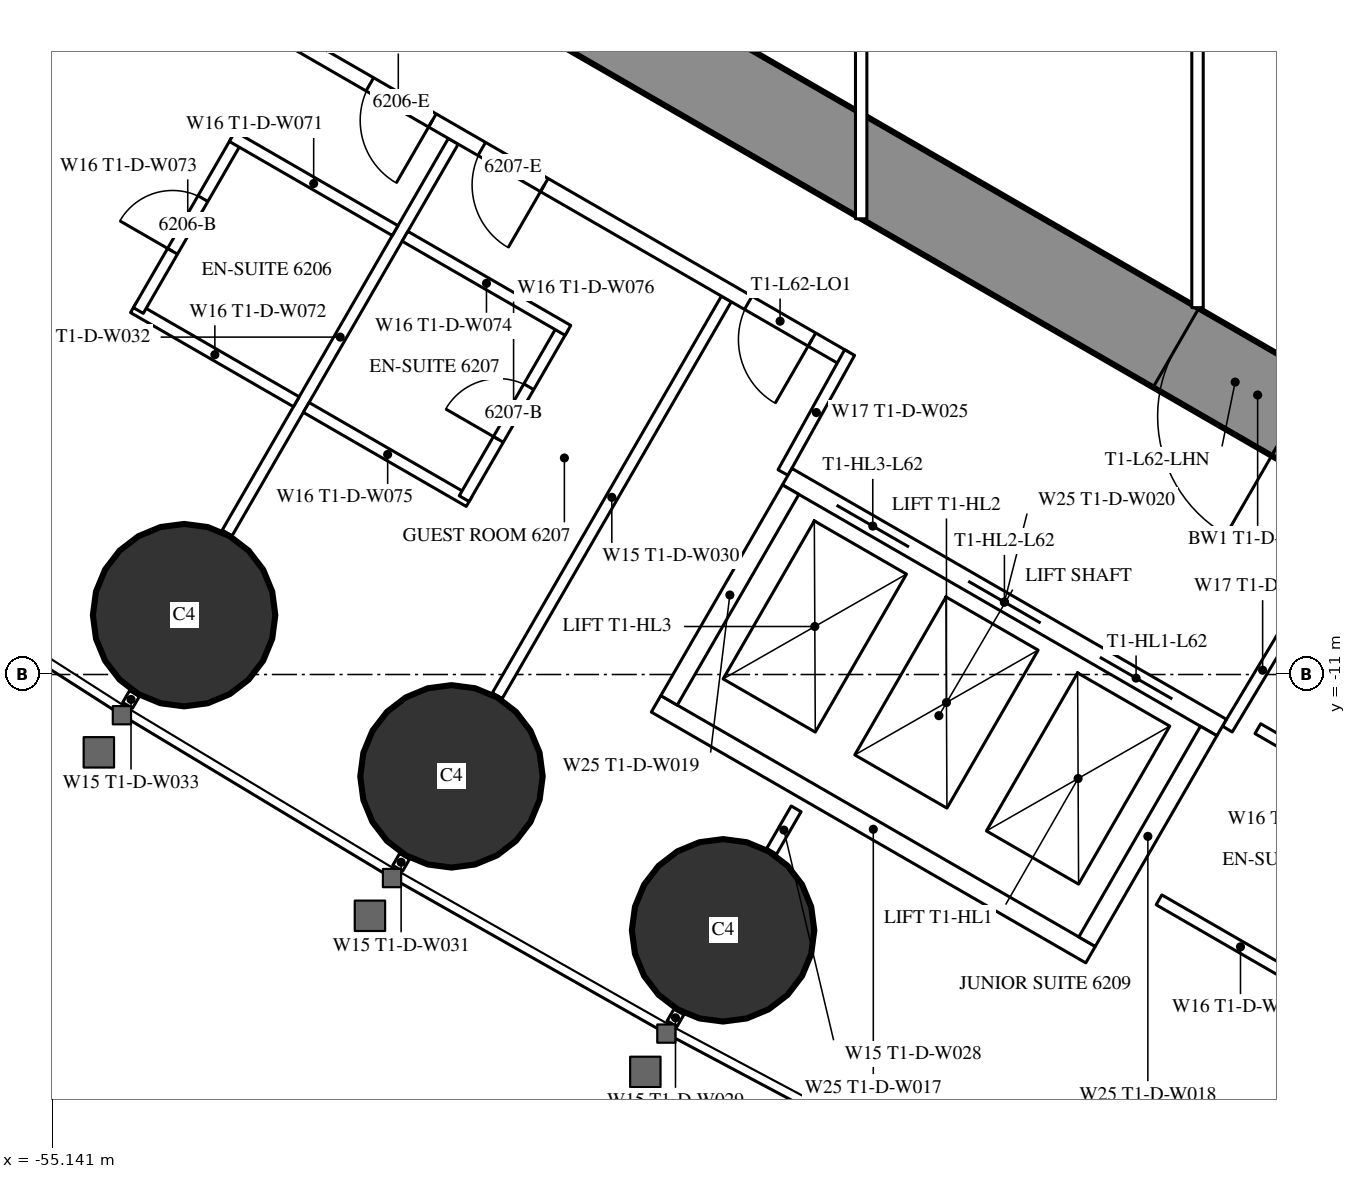
"""IFC4 building model, lengths in metres.
Left out: names, types, materials, properties, quantities, classifications, styles, units other than length and angle.
Written with IfcOpenShell. Run it as: python <this file> out.ifc"""

import sys

from ifc_helpers import new_model, si_unit, direction, frame, frame_2d, origin, origin_2d, place, context, subcontext, project, spatial, rectangle, circle, extrude, element, fill, save


model = new_model("IFC4")
c1 = context("Model", 3, precision=1e-05, world=origin(), true_north=direction((0.0, 1.0)))
c2 = subcontext(c1, "Body", "Model", "MODEL_VIEW")
j1 = project(units=[si_unit("LENGTHUNIT", "METRE"), si_unit("PLANEANGLEUNIT", "RADIAN")], contexts=[c1])
p1 = place(None, origin())
s1 = spatial("IfcSite", under=j1, at=p1, CompositionType="ELEMENT")
p2 = place(p1, origin())
s2 = spatial("IfcBuilding", under=s1, at=p2, CompositionType="ELEMENT")
p3 = place(p2, frame((0.0, 0.0, 233.3)))
s3 = spatial("IfcBuildingStorey", under=s2, at=p3, CompositionType="ELEMENT", Elevation=233.3)
for number, where, z_axis, x_axis in (
    (1, (-53.408, -10.219, 0.0), (0.0, 0.0, 1.0), (1.0, 0.0, 0.0)),
    (2, (-49.89, -12.34, 0.0), (0.0, 0.0, 1.0), (1.0, 0.0, 0.0)),
    (3, (-46.317, -14.365, 0.0), (0.0, 0.0, 1.0), (1.0, 0.0, 0.0)),
):
    element("IfcColumn", number, at=place(p3, frame(where, z_axis=z_axis, x_axis=x_axis)), inside=s3, PredefinedType="COLUMN", context=c2, shape_type="SweptSolid", body=[
        extrude(circle(Radius=1.2, at=origin_2d()), origin(), (0.0, 0.0, 1.0), 3.6),
    ])
p4 = place(p3, frame((-27.2, -14.3, 0.0), z_axis=(0.0, 0.0, 1.0), x_axis=(-0.866024021859, 0.500002393557, 0.0)))
e4 = element("IfcWall", 4, at=p4, inside=s3, PredefinedType="SHEAR", context=c2, shape_type="SweptSolid", body=[
    extrude(rectangle(XDim=27.907, YDim=1.2, at=frame_2d((13.954, 0.0))), origin(), (0.0, 0.0, 1.0), 3.6),
])
p5 = place(p4, frame((4.6, 0.0, 0.0)))
e5 = element("IfcOpeningElement", 5, at=p5, cuts=e4, PredefinedType="OPENING", context=c2, shape_type="SweptSolid", body=[
    extrude(rectangle(XDim=1.0, YDim=2.2, at=frame_2d((0.5, 1.1))), frame((0.0, 0.61, 0.0), z_axis=(0.0, -1.0, 0.0), x_axis=(1.0, 0.0, 0.0)), (0.0, 0.0, 1.0), 1.22),
])
p6 = place(p4, frame((13.395, 0.0, 0.0)))
e6 = element("IfcOpeningElement", 6, at=p6, cuts=e4, PredefinedType="OPENING", context=c2, shape_type="SweptSolid", body=[
    extrude(rectangle(XDim=1.8, YDim=2.2, at=frame_2d((0.9, 1.1))), frame((0.0, 0.61, 0.0), z_axis=(0.0, -1.0, 0.0), x_axis=(1.0, 0.0, 0.0)), (0.0, 0.0, 1.0), 1.22),
])
p7 = place(p3, frame((-46.898, -15.439, 0.0), z_axis=(0.0, 0.0, 1.0), x_axis=(-0.500232303069, -0.865891241997, 0.0)))
e7 = element("IfcWall", 7, at=p7, inside=s3, PredefinedType="PARTITIONING", context=c2, shape_type="SweptSolid", body=[
    extrude(rectangle(XDim=0.18, YDim=0.15, at=frame_2d((0.09, 0.0))), origin(), (0.0, 0.0, 1.0), 2.45),
])
p8 = place(p3, frame((-46.274, -6.059, 0.0), z_axis=(0.0, 0.0, 1.0), x_axis=(-0.500020471368, -0.866013584312, 0.0)))
e8 = element("IfcWall", 8, at=p8, inside=s3, PredefinedType="PARTITIONING", context=c2, shape_type="SweptSolid", body=[
    extrude(rectangle(XDim=6.028, YDim=0.15, at=frame_2d((3.014, 0.0))), origin(), (0.0, 0.0, 1.0), 2.45),
])
p9 = place(p3, frame((-50.508, -13.392, 0.0), z_axis=(0.0, 0.0, 1.0), x_axis=(-0.499644091975, -0.866230789891, 0.0)))
e9 = element("IfcWall", 9, at=p9, inside=s3, PredefinedType="PARTITIONING", context=c2, shape_type="SweptSolid", body=[
    extrude(rectangle(XDim=0.18, YDim=0.15, at=frame_2d((0.09, 0.0))), origin(), (0.0, 0.0, 1.0), 2.45),
])
p10 = place(p3, frame((-49.866, -3.985, 0.0), z_axis=(0.0, 0.0, 1.0), x_axis=(-0.500000694566, -0.866025002776, 0.0)))
e10 = element("IfcWall", 10, at=p10, inside=s3, PredefinedType="PARTITIONING", context=c2, shape_type="SweptSolid", body=[
    extrude(rectangle(XDim=5.95, YDim=0.15, at=frame_2d((2.975, 0.0))), origin(), (0.0, 0.0, 1.0), 2.45),
])
p11 = place(p3, frame((-54.061, -11.25, 0.0), z_axis=(0.0, 0.0, 1.0), x_axis=(-0.500391173478, -0.865799441849, 0.0)))
e11 = element("IfcWall", 11, at=p11, inside=s3, PredefinedType="PARTITIONING", context=c2, shape_type="SweptSolid", body=[
    extrude(rectangle(XDim=0.179, YDim=0.15, at=frame_2d((0.089, 0.0))), origin(), (0.0, 0.0, 1.0), 2.45),
])
p12 = place(p3, frame((-45.356, -12.767, 0.0), z_axis=(0.0, 0.0, 1.0), x_axis=(-0.499886366516, -0.866091000168, 0.0)))
e12 = element("IfcWall", 12, at=p12, inside=s3, PredefinedType="PARTITIONING", context=c2, shape_type="SweptSolid", body=[
    extrude(rectangle(XDim=0.645, YDim=0.15, at=frame_2d((0.322, 0.0))), origin(), (0.0, 0.0, 1.0), 3.35),
])
p13 = place(p3, frame((-44.715, -6.844, 0.0), z_axis=(0.0, 0.0, 1.0), x_axis=(-0.866025261224, 0.500000246922, 0.0)))
e13 = element("IfcWall", 13, at=p13, inside=s3, PredefinedType="PARTITIONING", context=c2, shape_type="SweptSolid", body=[
    extrude(rectangle(XDim=13.567, YDim=0.2, at=frame_2d((6.783, 0.0))), origin(), (0.0, 0.0, 1.0), 3.35),
])
p14 = place(p13, frame((6.266, 0.0, 0.0)))
e14 = element("IfcOpeningElement", 14, at=p14, cuts=e13, PredefinedType="OPENING", context=c2, shape_type="SweptSolid", body=[
    extrude(rectangle(XDim=0.95, YDim=2.2, at=frame_2d((0.475, 1.1))), frame((0.0, 0.11, 0.0), z_axis=(0.0, -1.0, 0.0), x_axis=(1.0, 0.0, 0.0)), (0.0, 0.0, 1.0), 0.22),
])
p15 = place(p13, frame((4.565, 0.0, 0.0)))
e15 = element("IfcOpeningElement", 15, at=p15, cuts=e13, PredefinedType="OPENING", context=c2, shape_type="SweptSolid", body=[
    extrude(rectangle(XDim=0.95, YDim=2.2, at=frame_2d((0.475, 1.1))), frame((0.0, 0.11, 0.0), z_axis=(0.0, -1.0, 0.0), x_axis=(1.0, 0.0, 0.0)), (0.0, 0.0, 1.0), 0.22),
])
p16 = place(p13, frame((0.5, 0.0, 0.0)))
e16 = element("IfcOpeningElement", 16, at=p16, cuts=e13, PredefinedType="OPENING", context=c2, shape_type="SweptSolid", body=[
    extrude(rectangle(XDim=0.967, YDim=2.2, at=frame_2d((0.483, 1.1))), frame((0.0, 0.11, 0.0), z_axis=(0.0, -1.0, 0.0), x_axis=(1.0, 0.0, 0.0)), (0.0, 0.0, 1.0), 0.22),
])
for number, where, z_axis, x_axis in (
    (17, (-39.683, -11.718, 0.0), (0.0, 0.0, 1.0), (0.514, 0.858, 0.0)),
    (18, (-44.652, -6.764, 0.0), (0.0, 0.0, 1.0), (-0.485, -0.874, 0.0)),
):
    element("IfcWall", number, at=place(p3, frame(where, z_axis=z_axis, x_axis=x_axis)), inside=s3, PredefinedType="PARTITIONING", context=c2, shape_type="SweptSolid", body=[
        extrude(rectangle(XDim=1.805, YDim=0.15, at=frame_2d((0.903, 0.0))), origin(), (0.0, 0.0, 1.0), 3.35),
    ])
p17 = place(p3, frame((-51.931, -7.411, 0.0), z_axis=(0.0, 0.0, 1.0), x_axis=(-0.866006523861, 0.500032699561, 0.0)))
e19 = element("IfcWall", 19, at=p17, inside=s3, PredefinedType="PARTITIONING", context=c2, shape_type="SweptSolid", body=[
    extrude(rectangle(XDim=2.475, YDim=0.15, at=frame_2d((1.237, 0.0))), origin(), (0.0, 0.0, 1.0), 3.35),
])
p18 = place(p3, frame((-52.71, -3.96, 0.0), z_axis=(0.0, 0.0, 1.0), x_axis=(-0.500006934395, -0.866021400173, 0.0)))
e20 = element("IfcWall", 20, at=p18, inside=s3, PredefinedType="PARTITIONING", context=c2, shape_type="SweptSolid", body=[
    extrude(rectangle(XDim=2.6, YDim=0.15, at=frame_2d((1.3, 0.0))), origin(), (0.0, 0.0, 1.0), 3.35),
])
p19 = place(p18, frame((0.9, 0.0, 0.0)))
e21 = element("IfcOpeningElement", 21, at=p19, cuts=e20, PredefinedType="OPENING", context=c2, shape_type="SweptSolid", body=[
    extrude(rectangle(XDim=0.8, YDim=2.2, at=frame_2d((0.4, 1.1))), frame((0.0, 0.085, 0.0), z_axis=(0.0, -1.0, 0.0), x_axis=(1.0, 0.0, 0.0)), (0.0, 0.0, 1.0), 0.17),
])
p20 = place(p3, frame((-50.631, -5.16, 0.0), z_axis=(0.0, 0.0, 1.0), x_axis=(-0.86604923931, 0.499958713387, 0.0)))
e22 = element("IfcWall", 22, at=p20, inside=s3, PredefinedType="PARTITIONING", context=c2, shape_type="SweptSolid", body=[
    extrude(rectangle(XDim=2.475, YDim=0.15, at=frame_2d((1.237, 0.0))), origin(), (0.0, 0.0, 1.0), 2.5),
])
p21 = place(p3, frame((-49.658, -8.724, 0.0), z_axis=(0.0, 0.0, 1.0), x_axis=(-0.866031185235, 0.4999899861, 0.0)))
e23 = element("IfcWall", 23, at=p21, inside=s3, PredefinedType="PARTITIONING", context=c2, shape_type="SweptSolid", body=[
    extrude(rectangle(XDim=2.475, YDim=0.15, at=frame_2d((1.238, 0.0))), origin(), (0.0, 0.0, 1.0), 3.35),
])
p22 = place(p3, frame((-48.423, -6.435, 0.0), z_axis=(0.0, 0.0, 1.0), x_axis=(-0.500006934395, -0.866021400173, 0.0)))
e24 = element("IfcWall", 24, at=p22, inside=s3, PredefinedType="PARTITIONING", context=c2, shape_type="SweptSolid", body=[
    extrude(rectangle(XDim=2.6, YDim=0.15, at=frame_2d((1.3, 0.0))), origin(), (0.0, 0.0, 1.0), 3.35),
])
p23 = place(p22, frame((0.9, 0.0, 0.0)))
e25 = element("IfcOpeningElement", 25, at=p23, cuts=e24, PredefinedType="OPENING", context=c2, shape_type="SweptSolid", body=[
    extrude(rectangle(XDim=0.8, YDim=2.2, at=frame_2d((0.4, 1.1))), frame((0.0, 0.085, 0.0), z_axis=(0.0, -1.0, 0.0), x_axis=(1.0, 0.0, 0.0)), (0.0, 0.0, 1.0), 0.17),
])
p24 = place(p3, frame((-48.358, -6.472, 0.0), z_axis=(0.0, 0.0, 1.0), x_axis=(-0.866073894602, 0.499916002032, 0.0)))
e26 = element("IfcWall", 26, at=p24, inside=s3, PredefinedType="PARTITIONING", context=c2, shape_type="SweptSolid", body=[
    extrude(rectangle(XDim=2.475, YDim=0.15, at=frame_2d((1.238, 0.0))), origin(), (0.0, 0.0, 1.0), 2.5),
])
p25 = place(p3, frame((-38.438, -15.202, 0.0), z_axis=(0.0, 0.0, 1.0), x_axis=(-0.866073894602, 0.499916002032, 0.0)))
e27 = element("IfcWall", 27, at=p25, inside=s3, PredefinedType="PARTITIONING", context=c2, shape_type="SweptSolid", body=[
    extrude(rectangle(XDim=2.475, YDim=0.15, at=frame_2d((1.238, 0.0))), origin(), (0.0, 0.0, 1.0), 3.35),
])
p26 = place(p3, frame((-37.138, -12.95, 0.0), z_axis=(0.0, 0.0, 1.0), x_axis=(-0.866031185235, 0.4999899861, 0.0)))
e28 = element("IfcWall", 28, at=p26, inside=s3, PredefinedType="PARTITIONING", context=c2, shape_type="SweptSolid", body=[
    extrude(rectangle(XDim=2.475, YDim=0.15, at=frame_2d((1.238, 0.0))), origin(), (0.0, 0.0, 1.0), 2.5),
])
p27 = place(p3, frame((-40.075, 6.174, 0.0), z_axis=(0.0, 0.0, 1.0), x_axis=(0.0, -1.0, 0.0)))
e29 = element("IfcWall", 29, at=p27, inside=s3, PredefinedType="PARTITIONING", context=c2, shape_type="SweptSolid", body=[
    extrude(rectangle(XDim=12.348, YDim=0.15, at=frame_2d((6.174, 0.0))), origin(), (0.0, 0.0, 1.0), 3.35),
])
p28 = place(p27, frame((5.274, 0.0, 0.0)))
e30 = element("IfcOpeningElement", 30, at=p28, cuts=e29, PredefinedType="OPENING", context=c2, shape_type="SweptSolid", body=[
    extrude(rectangle(XDim=1.8, YDim=2.2, at=frame_2d((0.9, 1.1))), frame((0.0, 0.085, 0.0), z_axis=(0.0, -1.0, 0.0), x_axis=(1.0, 0.0, 0.0)), (0.0, 0.0, 1.0), 0.17),
])
p29 = place(p3, frame((-44.5, 5.005, 0.0), z_axis=(0.0, 0.0, 1.0), x_axis=(0.0, -1.0, 0.0)))
e31 = element("IfcWall", 31, at=p29, inside=s3, PredefinedType="PARTITIONING", context=c2, shape_type="SweptSolid", body=[
    extrude(rectangle(XDim=10.009, YDim=0.15, at=frame_2d((5.005, 0.0))), origin(), (0.0, 0.0, 1.0), 2.5),
])
p30 = place(p29, frame((4.505, 0.0, 0.0)))
e32 = element("IfcOpeningElement", 32, at=p30, cuts=e31, PredefinedType="OPENING", context=c2, shape_type="SweptSolid", body=[
    extrude(rectangle(XDim=1.0, YDim=2.2, at=frame_2d((0.5, 1.1))), frame((0.0, 0.085, 0.0), z_axis=(0.0, -1.0, 0.0), x_axis=(1.0, 0.0, 0.0)), (0.0, 0.0, 1.0), 0.17),
])
p31 = place(p3, frame((-39.758, -11.697, 0.0), z_axis=(0.0, 0.0, 1.0), x_axis=(-0.866024194504, 0.500002094529, 0.0)))
e33 = element("IfcWall", 33, at=p31, inside=s3, PredefinedType="PARTITIONING", context=c2, shape_type="SweptSolid", body=[
    extrude(rectangle(XDim=6.6, YDim=0.25, at=frame_2d((3.3, 0.0))), origin(), (0.0, 0.0, 1.0), 3.35),
])
p32 = place(p31, frame((0.75, 0.0, 0.0)))
e34 = element("IfcOpeningElement", 34, at=p32, cuts=e33, PredefinedType="OPENING", context=c2, shape_type="SweptSolid", body=[
    extrude(rectangle(XDim=1.1, YDim=2.2, at=frame_2d((0.55, 1.1))), frame((0.0, 0.135, 0.0), z_axis=(0.0, -1.0, 0.0), x_axis=(1.0, 0.0, 0.0)), (0.0, 0.0, 1.0), 0.27),
])
p33 = place(p31, frame((2.75, 0.0, 0.0)))
e35 = element("IfcOpeningElement", 35, at=p33, cuts=e33, PredefinedType="OPENING", context=c2, shape_type="SweptSolid", body=[
    extrude(rectangle(XDim=1.1, YDim=2.2, at=frame_2d((0.55, 1.1))), frame((0.0, 0.135, 0.0), z_axis=(0.0, -1.0, 0.0), x_axis=(1.0, 0.0, 0.0)), (0.0, 0.0, 1.0), 0.27),
])
p34 = place(p31, frame((4.75, 0.0, 0.0)))
e36 = element("IfcOpeningElement", 36, at=p34, cuts=e33, PredefinedType="OPENING", context=c2, shape_type="SweptSolid", body=[
    extrude(rectangle(XDim=1.1, YDim=2.2, at=frame_2d((0.55, 1.1))), frame((0.0, 0.135, 0.0), z_axis=(0.0, -1.0, 0.0), x_axis=(1.0, 0.0, 0.0)), (0.0, 0.0, 1.0), 0.27),
])
p35 = place(p3, frame((-41.482, -14.686, 0.0), z_axis=(0.0, 0.0, 1.0), x_axis=(-0.86603344179, 0.499986077507, 0.0)))
e37 = element("IfcWall", 37, at=p35, inside=s3, PredefinedType="PARTITIONING", context=c2, shape_type="SweptSolid", body=[
    extrude(rectangle(XDim=6.6, YDim=0.25, at=frame_2d((3.3, 0.0))), origin(), (0.0, 0.0, 1.0), 3.35),
])
for number, where, z_axis, x_axis in (
    (38, (-39.928, -11.743, 0.0), (0.0, 0.0, 1.0), (-0.5, -0.866, 0.0)),
    (39, (-45.428, -8.568, 0.0), (0.0, 0.0, 1.0), (-0.5, -0.866, 0.0)),
):
    element("IfcWall", number, at=place(p3, frame(where, z_axis=z_axis, x_axis=x_axis)), inside=s3, PredefinedType="PARTITIONING", context=c2, shape_type="SweptSolid", body=[
        extrude(rectangle(XDim=3.201, YDim=0.25, at=frame_2d((1.6, 0.0))), origin(), (0.0, 0.0, 1.0), 3.35),
    ])
p36 = place(p19, origin())
e40 = element("IfcDoor", 40, at=p36, inside=s3, OperationType="SINGLE_SWING_RIGHT", PredefinedType="DOOR", context=c2, shape_type="SweptSolid", body=[
    extrude(rectangle(XDim=0.8, YDim=2.2, at=frame_2d((0.4, 1.1))), frame((0.0, 0.025, 0.0), z_axis=(0.0, -1.0, 0.0), x_axis=(1.0, 0.0, 0.0)), (0.0, 0.0, 1.0), 0.05),
])
fill(e21, e40)
p37 = place(p14, origin())
e41 = element("IfcDoor", 41, at=p37, inside=s3, OperationType="SINGLE_SWING_LEFT", PredefinedType="DOOR", context=c2, shape_type="SweptSolid", body=[
    extrude(rectangle(XDim=0.95, YDim=2.2, at=frame_2d((0.475, 1.1))), frame((0.0, 0.025, 0.0), z_axis=(0.0, -1.0, 0.0), x_axis=(1.0, 0.0, 0.0)), (0.0, 0.0, 1.0), 0.05),
])
fill(e14, e41)
p38 = place(p23, origin())
e42 = element("IfcDoor", 42, at=p38, inside=s3, OperationType="SINGLE_SWING_RIGHT", PredefinedType="DOOR", context=c2, shape_type="SweptSolid", body=[
    extrude(rectangle(XDim=0.8, YDim=2.2, at=frame_2d((0.4, 1.1))), frame((0.0, 0.025, 0.0), z_axis=(0.0, -1.0, 0.0), x_axis=(1.0, 0.0, 0.0)), (0.0, 0.0, 1.0), 0.05),
])
fill(e25, e42)
p39 = place(p15, origin())
e43 = element("IfcDoor", 43, at=p39, inside=s3, OperationType="SINGLE_SWING_LEFT", PredefinedType="DOOR", context=c2, shape_type="SweptSolid", body=[
    extrude(rectangle(XDim=0.95, YDim=2.2, at=frame_2d((0.475, 1.1))), frame((0.0, 0.025, 0.0), z_axis=(0.0, -1.0, 0.0), x_axis=(1.0, 0.0, 0.0)), (0.0, 0.0, 1.0), 0.05),
])
fill(e15, e43)
p40 = place(p16, origin())
e44 = element("IfcDoor", 44, at=p40, inside=s3, OperationType="SINGLE_SWING_LEFT", PredefinedType="DOOR", context=c2, shape_type="SweptSolid", body=[
    extrude(rectangle(XDim=0.967, YDim=2.2, at=frame_2d((0.483, 1.1))), frame((0.0, 0.025, 0.0), z_axis=(0.0, -1.0, 0.0), x_axis=(1.0, 0.0, 0.0)), (0.0, 0.0, 1.0), 0.05),
])
fill(e16, e44)
p41 = place(p6, origin())
e45 = element("IfcDoor", 45, at=p41, inside=s3, OperationType="DOUBLE_DOOR_SINGLE_SWING", PredefinedType="DOOR", context=c2, shape_type="SweptSolid", body=[
    extrude(rectangle(XDim=1.8, YDim=2.2, at=frame_2d((0.9, 1.1))), frame((0.0, 0.025, 0.0), z_axis=(0.0, -1.0, 0.0), x_axis=(1.0, 0.0, 0.0)), (0.0, 0.0, 1.0), 0.05),
])
fill(e6, e45)
p42 = place(p32, origin())
e46 = element("IfcDoor", 46, at=p42, inside=s3, OperationType="DOUBLE_DOOR_SLIDING", PredefinedType="USERDEFINED", context=c2, shape_type="SweptSolid", body=[
    extrude(rectangle(XDim=1.1, YDim=2.2, at=frame_2d((0.55, 1.1))), frame((0.0, 0.025, 0.0), z_axis=(0.0, -1.0, 0.0), x_axis=(1.0, 0.0, 0.0)), (0.0, 0.0, 1.0), 0.05),
])
fill(e34, e46)
p43 = place(p33, origin())
e47 = element("IfcDoor", 47, at=p43, inside=s3, OperationType="DOUBLE_DOOR_SLIDING", PredefinedType="USERDEFINED", context=c2, shape_type="SweptSolid", body=[
    extrude(rectangle(XDim=1.1, YDim=2.2, at=frame_2d((0.55, 1.1))), frame((0.0, 0.025, 0.0), z_axis=(0.0, -1.0, 0.0), x_axis=(1.0, 0.0, 0.0)), (0.0, 0.0, 1.0), 0.05),
])
fill(e35, e47)
p44 = place(p34, origin())
e48 = element("IfcDoor", 48, at=p44, inside=s3, OperationType="DOUBLE_DOOR_SLIDING", PredefinedType="USERDEFINED", context=c2, shape_type="SweptSolid", body=[
    extrude(rectangle(XDim=1.1, YDim=2.2, at=frame_2d((0.55, 1.1))), frame((0.0, 0.025, 0.0), z_axis=(0.0, -1.0, 0.0), x_axis=(1.0, 0.0, 0.0)), (0.0, 0.0, 1.0), 0.05),
])
fill(e36, e48)
save(model, sys.argv[1])
